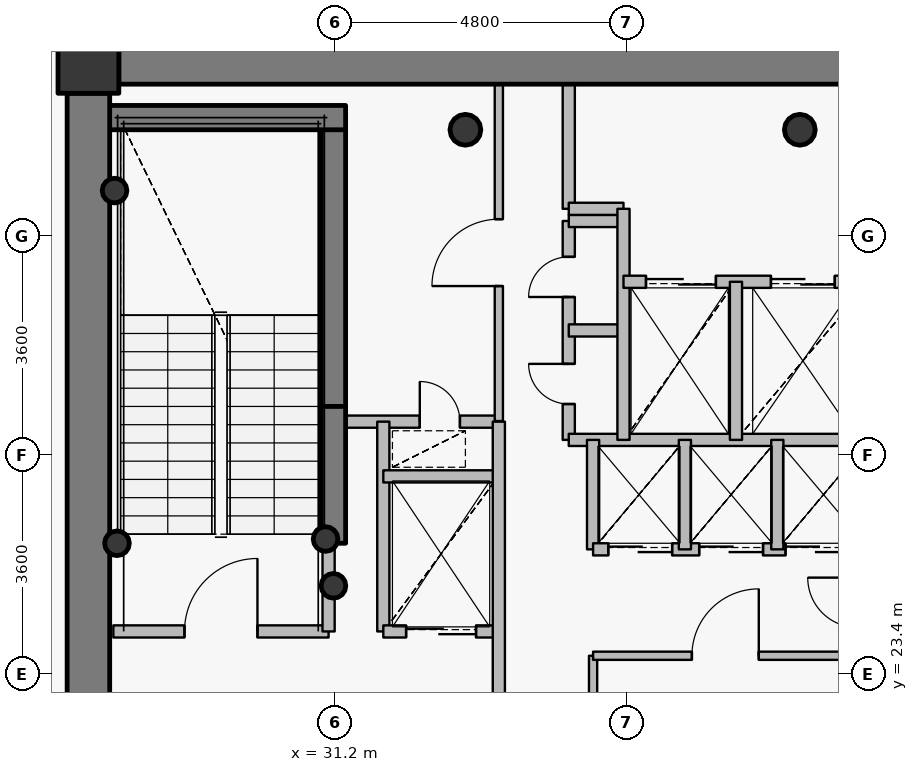
"""IFC4 building model, lengths in metres.
Left out: names, types, materials, properties, quantities, classifications, styles, units other than length and angle.
Written with IfcOpenShell. Run it as: python <this file> out.ifc"""

import sys

from ifc_helpers import new_model, si_unit, direction, frame, frame_2d, origin, origin_2d, place, context, subcontext, project, spatial, rectangle, hollow_circle, extrude, source, transform, mapped, element, fill, save


model = new_model("IFC4")
c1 = context("Model", 3, precision=1e-05, world=origin(), true_north=direction((0.0, 1.0)))
c2 = subcontext(c1, "Body", "Model", "MODEL_VIEW")
j1 = project(units=[si_unit("LENGTHUNIT", "METRE"), si_unit("PLANEANGLEUNIT", "RADIAN")], contexts=[c1])
p1 = place(None, origin())
s1 = spatial("IfcSite", under=j1, at=p1, CompositionType="ELEMENT")
p2 = place(p1, origin())
s2 = spatial("IfcBuilding", under=s1, at=p2, CompositionType="ELEMENT")
p3 = place(p2, frame((0.0, 0.0, 291.75)))
s3 = spatial("IfcBuildingStorey", under=s2, at=p3, CompositionType="ELEMENT", Elevation=291.75)
p4 = place(p3, frame((27.15, 33.45, 0.0), z_axis=(0.0, 0.0, 1.0), x_axis=(1.0, 0.0, 0.0)))
e1 = element("IfcColumn", 1, at=p4, inside=s3, PredefinedType="COLUMN", context=c2, shape_type="SweptSolid", body=[
    extrude(rectangle(XDim=1.0, YDim=1.0, at=origin_2d()), origin(), (0.0, 0.0, 1.0), 3.75),
])
for number, where, z_axis, x_axis in (
    (2, (38.85, 32.35, 0.0), (0.0, 0.0, 1.0), (1.0, 0.0, 0.0)),
    (3, (33.35, 32.35, 0.0), (0.0, 0.0, 1.0), (1.0, 0.0, 0.0)),
):
    element("IfcColumn", number, at=place(p3, frame(where, z_axis=z_axis, x_axis=x_axis)), inside=s3, PredefinedType="COLUMN", context=c2, shape_type="SweptSolid", body=[
        extrude(hollow_circle(Radius=0.254, WallThickness=0.02, at=origin_2d()), origin(), (0.0, 0.0, 1.0), 3.75),
    ])
p5 = place(p3, frame((31.18, 27.8, 0.0), z_axis=(0.0, 0.0, 1.0), x_axis=(0.0, 1.0, 0.0)))
e4 = element("IfcWall", 4, at=p5, inside=s3, PredefinedType="SHEAR", context=c2, shape_type="SweptSolid", body=[
    extrude(rectangle(XDim=4.75, YDim=0.4, at=frame_2d((2.375, 0.0))), origin(), (0.0, 0.0, 1.0), 3.75),
])
p6 = place(p3, frame((27.25, 32.55, 0.0), z_axis=(0.0, 0.0, 1.0), x_axis=(1.0, 0.0, 0.0)))
e5 = element("IfcWall", 5, at=p6, inside=s3, PredefinedType="SHEAR", context=c2, shape_type="SweptSolid", body=[
    extrude(rectangle(XDim=4.13, YDim=0.4, at=frame_2d((2.065, 0.0))), origin(), (0.0, 0.0, 1.0), 3.75),
])
for number, where, z_axis, x_axis in (
    (6, (27.58, 31.35, 0.0), (0.0, 0.0, 1.0), (1.0, 0.0, 0.0)),
    (7, (31.05, 25.62, 0.0), (0.0, 0.0, 1.0), (1.0, 0.0, 0.0)),
    (8, (31.18, 24.85, 0.0), (0.0, 0.0, 1.0), (1.0, 0.0, 0.0)),
    (9, (27.62, 25.55, 0.0), (0.0, 0.0, 1.0), (1.0, 0.0, 0.0)),
):
    element("IfcColumn", number, at=place(p3, frame(where, z_axis=z_axis, x_axis=x_axis)), inside=s3, PredefinedType="COLUMN", context=c2, shape_type="SweptSolid", body=[
        extrude(hollow_circle(Radius=0.203, WallThickness=0.016, at=origin_2d()), origin(), (0.0, 0.0, 1.0), 3.75),
    ])
p7 = place(p3, frame((27.65, 33.45, 0.0), z_axis=(0.0, 0.0, 1.0), x_axis=(1.0, 0.0, 0.0)))
e10 = element("IfcWall", 10, at=p7, inside=s3, PredefinedType="SHEAR", context=c2, shape_type="SweptSolid", body=[
    extrude(rectangle(XDim=16.7, YDim=0.7, at=frame_2d((8.35, 0.0))), origin(), (0.0, 0.0, 1.0), 3.05),
])
p8 = place(p7, frame((12.775, 0.0, 0.0)))
e11 = element("IfcOpeningElement", 11, at=p8, cuts=e10, PredefinedType="OPENING", context=c2, shape_type="SweptSolid", body=[
    extrude(rectangle(XDim=1.15, YDim=2.15, at=origin_2d()), frame((0.575, 0.36, 1.075), z_axis=(0.0, -1.0, 0.0), x_axis=(1.0, 0.0, 0.0)), (0.0, 0.0, 1.0), 0.72),
])
p9 = place(p3, frame((27.15, 21.05, 0.0), z_axis=(0.0, 0.0, 1.0), x_axis=(0.0, 1.0, 0.0)))
e12 = element("IfcWall", 12, at=p9, inside=s3, PredefinedType="SHEAR", context=c2, shape_type="SweptSolid", body=[
    extrude(rectangle(XDim=11.9, YDim=0.7, at=frame_2d((5.95, 0.0))), origin(), (0.0, 0.0, 1.0), 3.05),
])
p10 = place(p3, frame((31.18, 25.55, 0.0), z_axis=(0.0, 0.0, 1.0), x_axis=(0.0, 1.0, 0.0)))
e13 = element("IfcWall", 13, at=p10, inside=s3, PredefinedType="SHEAR", context=c2, shape_type="SweptSolid", body=[
    extrude(rectangle(XDim=2.25, YDim=0.4, at=frame_2d((1.125, 0.0))), origin(), (0.0, 0.0, 1.0), 3.1),
])
p11 = place(p3, frame((27.56, 24.1, 0.0), z_axis=(0.0, 0.0, 1.0), x_axis=(1.0, 0.0, 0.0)))
e14 = element("IfcWall", 14, at=p11, inside=s3, PredefinedType="PARTITIONING", context=c2, shape_type="SweptSolid", body=[
    extrude(rectangle(XDim=3.54, YDim=0.2, at=frame_2d((1.77, 0.0))), origin(), (0.0, 0.0, 1.0), 3.5),
])
p12 = place(p11, frame((1.17, 0.0, 0.0)))
e15 = element("IfcOpeningElement", 15, at=p12, cuts=e14, PredefinedType="OPENING", context=c2, shape_type="SweptSolid", body=[
    extrude(rectangle(XDim=1.2, YDim=2.15, at=origin_2d()), frame((0.6, 0.11, 1.075), z_axis=(0.0, -1.0, 0.0), x_axis=(1.0, 0.0, 0.0)), (0.0, 0.0, 1.0), 0.22),
])
p13 = place(p3, frame((31.1, 24.1, 0.0), z_axis=(0.0, 0.0, 1.0), x_axis=(0.0, 1.0, 0.0)))
e16 = element("IfcWall", 16, at=p13, inside=s3, PredefinedType="PARTITIONING", context=c2, shape_type="SweptSolid", body=[
    extrude(rectangle(XDim=1.44, YDim=0.2, at=frame_2d((0.72, 0.0))), origin(), (0.0, 0.0, 1.0), 3.5),
])
p14 = place(p3, frame((31.1, 27.55, 0.0), z_axis=(0.0, 0.0, 1.0), x_axis=(1.0, 0.0, 0.0)))
e17 = element("IfcWall", 17, at=p14, inside=s3, PredefinedType="PARTITIONING", context=c2, shape_type="SweptSolid", body=[
    extrude(rectangle(XDim=2.8, YDim=0.2, at=frame_2d((1.4, 0.0))), origin(), (0.0, 0.0, 1.0), 3.085),
])
p15 = place(p14, frame((1.5, 0.0, 0.0)))
e18 = element("IfcOpeningElement", 18, at=p15, cuts=e17, PredefinedType="OPENING", context=c2, shape_type="SweptSolid", body=[
    extrude(rectangle(XDim=0.66, YDim=2.05, at=origin_2d()), frame((0.33, 0.11, 1.025), z_axis=(0.0, -1.0, 0.0), x_axis=(1.0, 0.0, 0.0)), (0.0, 0.0, 1.0), 0.22),
])
p16 = place(p3, frame((32.0, 24.1, 0.0), z_axis=(0.0, 0.0, 1.0), x_axis=(0.0, 1.0, 0.0)))
e19 = element("IfcWall", 19, at=p16, inside=s3, PredefinedType="PARTITIONING", context=c2, shape_type="SweptSolid", body=[
    extrude(rectangle(XDim=3.45, YDim=0.2, at=frame_2d((1.725, 0.0))), origin(), (0.0, 0.0, 1.0), 3.5),
])
p17 = place(p3, frame((32.0, 24.1, 0.0), z_axis=(0.0, 0.0, 1.0), x_axis=(1.0, 0.0, 0.0)))
e20 = element("IfcWall", 20, at=p17, inside=s3, PredefinedType="PARTITIONING", context=c2, shape_type="SweptSolid", body=[
    extrude(rectangle(XDim=1.9, YDim=0.2, at=frame_2d((0.95, 0.0))), origin(), (0.0, 0.0, 1.0), 3.085),
])
p18 = place(p17, frame((0.375, 0.0, 0.0)))
e21 = element("IfcOpeningElement", 21, at=p18, cuts=e20, PredefinedType="OPENING", context=c2, shape_type="SweptSolid", body=[
    extrude(rectangle(XDim=1.15, YDim=2.15, at=origin_2d()), frame((0.575, 0.11, 1.075), z_axis=(0.0, -1.0, 0.0), x_axis=(1.0, 0.0, 0.0)), (0.0, 0.0, 1.0), 0.22),
])
p19 = place(p3, frame((32.0, 26.65, 0.0), z_axis=(0.0, 0.0, 1.0), x_axis=(1.0, 0.0, 0.0)))
e22 = element("IfcWall", 22, at=p19, inside=s3, PredefinedType="PARTITIONING", context=c2, shape_type="SweptSolid", body=[
    extrude(rectangle(XDim=1.9, YDim=0.2, at=frame_2d((0.95, 0.0))), origin(), (0.0, 0.0, 1.0), 3.085),
])
p20 = place(p3, frame((33.9, 20.9, 0.0), z_axis=(0.0, 0.0, 1.0), x_axis=(0.0, 1.0, 0.0)))
e23 = element("IfcWall", 23, at=p20, inside=s3, PredefinedType="PARTITIONING", context=c2, shape_type="SweptSolid", body=[
    extrude(rectangle(XDim=6.65, YDim=0.2, at=frame_2d((3.325, 0.0))), origin(), (0.0, 0.0, 1.0), 3.085),
])
p21 = place(p3, frame((33.9, 27.56, 0.0), z_axis=(0.0, 0.0, 1.0), x_axis=(0.0, 1.0, 0.0)))
e24 = element("IfcWall", 24, at=p21, inside=s3, PredefinedType="PARTITIONING", context=c2, shape_type="SweptSolid", body=[
    extrude(rectangle(XDim=5.54, YDim=0.135, at=frame_2d((2.77, 0.0))), origin(), (0.0, 0.0, 1.0), 3.085),
])
p22 = place(p21, frame((2.22, 0.0, 0.0)))
e25 = element("IfcOpeningElement", 25, at=p22, cuts=e24, PredefinedType="OPENING", context=c2, shape_type="SweptSolid", body=[
    extrude(rectangle(XDim=1.1, YDim=2.15, at=origin_2d()), frame((0.55, 0.078, 1.075), z_axis=(0.0, -1.0, 0.0), x_axis=(1.0, 0.0, 0.0)), (0.0, 0.0, 1.0), 0.155),
])
p23 = place(p3, frame((35.05, 27.25, 0.0), z_axis=(0.0, 0.0, 1.0), x_axis=(0.0, 1.0, 0.0)))
e26 = element("IfcWall", 26, at=p23, inside=s3, PredefinedType="PARTITIONING", context=c2, shape_type="SweptSolid", body=[
    extrude(rectangle(XDim=3.6, YDim=0.2, at=frame_2d((1.8, 0.0))), origin(), (0.0, 0.0, 1.0), 3.5),
])
p24 = place(p23, frame((0.59, 0.0, 0.0)))
e27 = element("IfcOpeningElement", 27, at=p24, cuts=e26, PredefinedType="OPENING", context=c2, shape_type="SweptSolid", body=[
    extrude(rectangle(XDim=0.66, YDim=2.05, at=origin_2d()), frame((0.33, 0.11, 1.025), z_axis=(0.0, -1.0, 0.0), x_axis=(1.0, 0.0, 0.0)), (0.0, 0.0, 1.0), 0.22),
])
p25 = place(p23, frame((2.35, 0.0, 0.0)))
e28 = element("IfcOpeningElement", 28, at=p25, cuts=e26, PredefinedType="OPENING", context=c2, shape_type="SweptSolid", body=[
    extrude(rectangle(XDim=0.66, YDim=2.05, at=origin_2d()), frame((0.33, 0.11, 1.025), z_axis=(0.0, -1.0, 0.0), x_axis=(1.0, 0.0, 0.0)), (0.0, 0.0, 1.0), 0.22),
])
p26 = place(p3, frame((35.05, 27.25, 0.0), z_axis=(0.0, 0.0, 1.0), x_axis=(1.0, 0.0, 0.0)))
e29 = element("IfcWall", 29, at=p26, inside=s3, PredefinedType="PARTITIONING", context=c2, shape_type="SweptSolid", body=[
    extrude(rectangle(XDim=4.95, YDim=0.2, at=frame_2d((2.475, 0.0))), origin(), (0.0, 0.0, 1.0), 3.085),
])
for number, where, z_axis, x_axis in (
    (30, (35.05, 29.05, 0.0), (0.0, 0.0, 1.0), (1.0, 0.0, 0.0)),
    (31, (35.05, 30.85, 0.0), (0.0, 0.0, 1.0), (1.0, 0.0, 0.0)),
):
    element("IfcWall", number, at=place(p3, frame(where, z_axis=z_axis, x_axis=x_axis)), inside=s3, PredefinedType="PARTITIONING", context=c2, shape_type="SweptSolid", body=[
        extrude(rectangle(XDim=0.9, YDim=0.2, at=frame_2d((0.45, 0.0))), origin(), (0.0, 0.0, 1.0), 3.5),
    ])
p27 = place(p3, frame((35.05, 31.05, 0.0), z_axis=(0.0, 0.0, 1.0), x_axis=(0.0, 1.0, 0.0)))
e32 = element("IfcWall", 32, at=p27, inside=s3, PredefinedType="PARTITIONING", context=c2, shape_type="SweptSolid", body=[
    extrude(rectangle(XDim=2.05, YDim=0.2, at=frame_2d((1.025, 0.0))), origin(), (0.0, 0.0, 1.0), 3.085),
])
p28 = place(p3, frame((35.05, 31.05, 0.0), z_axis=(0.0, 0.0, 1.0), x_axis=(1.0, 0.0, 0.0)))
e33 = element("IfcWall", 33, at=p28, inside=s3, PredefinedType="PARTITIONING", context=c2, shape_type="SweptSolid", body=[
    extrude(rectangle(XDim=0.9, YDim=0.2, at=frame_2d((0.45, 0.0))), origin(), (0.0, 0.0, 1.0), 3.5),
])
p29 = place(p3, frame((35.45, 20.9, 0.0), z_axis=(0.0, 0.0, 1.0), x_axis=(0.0, 1.0, 0.0)))
e34 = element("IfcWall", 34, at=p29, inside=s3, PredefinedType="PARTITIONING", context=c2, shape_type="SweptSolid", body=[
    extrude(rectangle(XDim=2.8, YDim=0.135, at=frame_2d((1.4, 0.0))), origin(), (0.0, 0.0, 1.0), 3.085),
])
p30 = place(p3, frame((35.45, 23.7, 0.0), z_axis=(0.0, 0.0, 1.0), x_axis=(1.0, 0.0, 0.0)))
e35 = element("IfcWall", 35, at=p30, inside=s3, PredefinedType="PARTITIONING", context=c2, shape_type="SweptSolid", body=[
    extrude(rectangle(XDim=4.35, YDim=0.135, at=frame_2d((2.175, 0.0))), origin(), (0.0, 0.0, 1.0), 3.085),
])
p31 = place(p30, frame((1.625, 0.0, 0.0)))
e36 = element("IfcOpeningElement", 36, at=p31, cuts=e35, PredefinedType="OPENING", context=c2, shape_type="SweptSolid", body=[
    extrude(rectangle(XDim=1.1, YDim=2.15, at=origin_2d()), frame((0.55, 0.078, 1.075), z_axis=(0.0, -1.0, 0.0), x_axis=(1.0, 0.0, 0.0)), (0.0, 0.0, 1.0), 0.155),
])
p32 = place(p3, frame((35.45, 25.45, 0.0), z_axis=(0.0, 0.0, 1.0), x_axis=(0.0, 1.0, 0.0)))
e37 = element("IfcWall", 37, at=p32, inside=s3, PredefinedType="PARTITIONING", context=c2, shape_type="SweptSolid", body=[
    extrude(rectangle(XDim=1.8, YDim=0.2, at=frame_2d((0.9, 0.0))), origin(), (0.0, 0.0, 1.0), 3.5),
])
p33 = place(p3, frame((35.45, 25.45, 0.0), z_axis=(0.0, 0.0, 1.0), x_axis=(1.0, 0.0, 0.0)))
e38 = element("IfcWall", 38, at=p33, inside=s3, PredefinedType="PARTITIONING", context=c2, shape_type="SweptSolid", body=[
    extrude(rectangle(XDim=4.55, YDim=0.2, at=frame_2d((2.275, 0.0))), origin(), (0.0, 0.0, 1.0), 3.085),
])
p34 = place(p33, frame((0.25, 0.0, 0.0)))
e39 = element("IfcOpeningElement", 39, at=p34, cuts=e38, PredefinedType="OPENING", context=c2, shape_type="SweptSolid", body=[
    extrude(rectangle(XDim=1.05, YDim=2.15, at=origin_2d()), frame((0.525, 0.11, 1.075), z_axis=(0.0, -1.0, 0.0), x_axis=(1.0, 0.0, 0.0)), (0.0, 0.0, 1.0), 0.22),
])
p35 = place(p33, frame((1.745, 0.0, 0.0)))
e40 = element("IfcOpeningElement", 40, at=p35, cuts=e38, PredefinedType="OPENING", context=c2, shape_type="SweptSolid", body=[
    extrude(rectangle(XDim=1.05, YDim=2.15, at=origin_2d()), frame((0.525, 0.11, 1.075), z_axis=(0.0, -1.0, 0.0), x_axis=(1.0, 0.0, 0.0)), (0.0, 0.0, 1.0), 0.22),
])
p36 = place(p33, frame((3.165, 0.0, 0.0)))
e41 = element("IfcOpeningElement", 41, at=p36, cuts=e38, PredefinedType="OPENING", context=c2, shape_type="SweptSolid", body=[
    extrude(rectangle(XDim=1.05, YDim=2.15, at=origin_2d()), frame((0.525, 0.11, 1.075), z_axis=(0.0, -1.0, 0.0), x_axis=(1.0, 0.0, 0.0)), (0.0, 0.0, 1.0), 0.22),
])
p37 = place(p3, frame((35.95, 27.25, 0.0), z_axis=(0.0, 0.0, 1.0), x_axis=(0.0, 1.0, 0.0)))
e42 = element("IfcWall", 42, at=p37, inside=s3, PredefinedType="PARTITIONING", context=c2, shape_type="SweptSolid", body=[
    extrude(rectangle(XDim=3.8, YDim=0.2, at=frame_2d((1.9, 0.0))), origin(), (0.0, 0.0, 1.0), 3.5),
])
p38 = place(p3, frame((35.95, 29.85, 0.0), z_axis=(0.0, 0.0, 1.0), x_axis=(1.0, 0.0, 0.0)))
e43 = element("IfcWall", 43, at=p38, inside=s3, PredefinedType="PARTITIONING", context=c2, shape_type="SweptSolid", body=[
    extrude(rectangle(XDim=8.49, YDim=0.2, at=frame_2d((4.245, 0.0))), origin(), (0.0, 0.0, 1.0), 3.085),
])
p39 = place(p38, frame((6.1, 0.0, 0.0)))
e44 = element("IfcOpeningElement", 44, at=p39, cuts=e43, PredefinedType="OPENING", context=c2, shape_type="SweptSolid", body=[
    extrude(rectangle(XDim=1.2, YDim=2.15, at=origin_2d()), frame((0.6, 0.11, 1.075), z_axis=(0.0, -1.0, 0.0), x_axis=(1.0, 0.0, 0.0)), (0.0, 0.0, 1.0), 0.22),
])
p40 = place(p38, frame((0.37, 0.0, 0.0)))
e45 = element("IfcOpeningElement", 45, at=p40, cuts=e43, PredefinedType="OPENING", context=c2, shape_type="SweptSolid", body=[
    extrude(rectangle(XDim=1.15, YDim=2.15, at=origin_2d()), frame((0.575, 0.11, 1.075), z_axis=(0.0, -1.0, 0.0), x_axis=(1.0, 0.0, 0.0)), (0.0, 0.0, 1.0), 0.22),
])
p41 = place(p38, frame((2.425, 0.0, 0.0)))
e46 = element("IfcOpeningElement", 46, at=p41, cuts=e43, PredefinedType="OPENING", context=c2, shape_type="SweptSolid", body=[
    extrude(rectangle(XDim=1.05, YDim=2.15, at=origin_2d()), frame((0.525, 0.11, 1.075), z_axis=(0.0, -1.0, 0.0), x_axis=(1.0, 0.0, 0.0)), (0.0, 0.0, 1.0), 0.22),
])
p42 = place(p3, frame((36.96, 25.45, 0.0), z_axis=(0.0, 0.0, 1.0), x_axis=(0.0, 1.0, 0.0)))
e47 = element("IfcWall", 47, at=p42, inside=s3, PredefinedType="PARTITIONING", context=c2, shape_type="SweptSolid", body=[
    extrude(rectangle(XDim=1.8, YDim=0.2, at=frame_2d((0.9, 0.0))), origin(), (0.0, 0.0, 1.0), 3.5),
])
p43 = place(p3, frame((37.8, 27.25, 0.0), z_axis=(0.0, 0.0, 1.0), x_axis=(0.0, 1.0, 0.0)))
e48 = element("IfcWall", 48, at=p43, inside=s3, PredefinedType="PARTITIONING", context=c2, shape_type="SweptSolid", body=[
    extrude(rectangle(XDim=2.6, YDim=0.2, at=frame_2d((1.3, 0.0))), origin(), (0.0, 0.0, 1.0), 3.5),
])
p44 = place(p3, frame((38.48, 25.45, 0.0), z_axis=(0.0, 0.0, 1.0), x_axis=(0.0, 1.0, 0.0)))
e49 = element("IfcWall", 49, at=p44, inside=s3, PredefinedType="PARTITIONING", context=c2, shape_type="SweptSolid", body=[
    extrude(rectangle(XDim=1.8, YDim=0.2, at=frame_2d((0.9, 0.0))), origin(), (0.0, 0.0, 1.0), 3.5),
])
p45 = place(p3, frame((26.8, 33.492, 0.0), z_axis=(0.0, 0.0, 1.0), x_axis=(0.0, -1.0, 0.0)))
e50 = element("IfcWall", 50, at=p45, inside=s3, PredefinedType="PARTITIONING", context=c2, shape_type="SweptSolid", body=[
    extrude(rectangle(XDim=0.532, YDim=0.135, at=frame_2d((0.266, 0.0))), origin(), (0.0, 0.0, 1.0), 3.5),
])
m1 = source(origin(), c2, "Body", "SweptSolid", [
    extrude(rectangle(XDim=1.2, YDim=2.15, at=origin_2d()), frame((0.6, 0.025, 1.075), z_axis=(0.0, -1.0, 0.0), x_axis=(1.0, 0.0, 0.0)), (0.0, 0.0, 1.0), 0.05),
])
p46 = place(p12, origin())
e51 = element("IfcDoor", 51, at=p46, inside=s3, OperationType="SINGLE_SWING_RIGHT", PredefinedType="DOOR", context=c2, shape_type="MappedRepresentation", body=[
    mapped(m1, transform((0.0, 0.0, 0.0), x_axis=(1.0, 0.0, 0.0), y_axis=(0.0, 1.0, 0.0), z_axis=(0.0, 0.0, 1.0), scale=1.0)),
])
fill(e15, e51)
m2 = source(origin(), c2, "Body", "SweptSolid", [
    extrude(rectangle(XDim=1.15, YDim=2.15, at=origin_2d()), frame((0.575, 0.025, 1.075), z_axis=(0.0, -1.0, 0.0), x_axis=(1.0, 0.0, 0.0)), (0.0, 0.0, 1.0), 0.05),
])
p47 = place(p40, origin())
e52 = element("IfcDoor", 52, at=p47, inside=s3, OperationType="DOUBLE_DOOR_SLIDING", PredefinedType="USERDEFINED", context=c2, shape_type="MappedRepresentation", body=[
    mapped(m2, transform((0.0, 0.0, 0.0), x_axis=(1.0, 0.0, 0.0), y_axis=(0.0, 1.0, 0.0), z_axis=(0.0, 0.0, 1.0), scale=1.0)),
])
fill(e45, e52)
p48 = place(p18, origin())
e53 = element("IfcDoor", 53, at=p48, inside=s3, OperationType="DOUBLE_DOOR_SLIDING", PredefinedType="USERDEFINED", context=c2, shape_type="MappedRepresentation", body=[
    mapped(m2, transform((0.0, 0.0, 0.0), x_axis=(1.0, 0.0, 0.0), y_axis=(0.0, 1.0, 0.0), z_axis=(0.0, 0.0, 1.0), scale=1.0)),
])
fill(e21, e53)
m3 = source(origin(), c2, "Body", "SweptSolid", [
    extrude(rectangle(XDim=1.05, YDim=2.15, at=origin_2d()), frame((0.525, 0.025, 1.075), z_axis=(0.0, -1.0, 0.0), x_axis=(1.0, 0.0, 0.0)), (0.0, 0.0, 1.0), 0.05),
])
p49 = place(p41, origin())
e54 = element("IfcDoor", 54, at=p49, inside=s3, OperationType="DOUBLE_DOOR_SLIDING", PredefinedType="USERDEFINED", context=c2, shape_type="MappedRepresentation", body=[
    mapped(m3, transform((0.0, 0.0, 0.0), x_axis=(1.0, 0.0, 0.0), y_axis=(0.0, 1.0, 0.0), z_axis=(0.0, 0.0, 1.0), scale=1.0)),
])
fill(e46, e54)
p50 = place(p34, origin())
e55 = element("IfcDoor", 55, at=p50, inside=s3, OperationType="DOUBLE_DOOR_SLIDING", PredefinedType="USERDEFINED", context=c2, shape_type="MappedRepresentation", body=[
    mapped(m3, transform((0.0, 0.0, 0.0), x_axis=(1.0, 0.0, 0.0), y_axis=(0.0, 1.0, 0.0), z_axis=(0.0, 0.0, 1.0), scale=1.0)),
])
fill(e39, e55)
p51 = place(p35, origin())
e56 = element("IfcDoor", 56, at=p51, inside=s3, OperationType="DOUBLE_DOOR_SLIDING", PredefinedType="USERDEFINED", context=c2, shape_type="MappedRepresentation", body=[
    mapped(m3, transform((0.0, 0.0, 0.0), x_axis=(1.0, 0.0, 0.0), y_axis=(0.0, 1.0, 0.0), z_axis=(0.0, 0.0, 1.0), scale=1.0)),
])
fill(e40, e56)
p52 = place(p36, origin())
e57 = element("IfcDoor", 57, at=p52, inside=s3, OperationType="DOUBLE_DOOR_SLIDING", PredefinedType="USERDEFINED", context=c2, shape_type="MappedRepresentation", body=[
    mapped(m3, transform((0.0, 0.0, 0.0), x_axis=(1.0, 0.0, 0.0), y_axis=(0.0, 1.0, 0.0), z_axis=(0.0, 0.0, 1.0), scale=1.0)),
])
fill(e41, e57)
m4 = source(origin(), c2, "Body", "SweptSolid", [
    extrude(rectangle(XDim=0.66, YDim=2.05, at=origin_2d()), frame((0.33, 0.025, 1.025), z_axis=(0.0, -1.0, 0.0), x_axis=(1.0, 0.0, 0.0)), (0.0, 0.0, 1.0), 0.05),
])
p53 = place(p24, origin())
e58 = element("IfcDoor", 58, at=p53, inside=s3, OperationType="SINGLE_SWING_RIGHT", PredefinedType="USERDEFINED", context=c2, shape_type="MappedRepresentation", body=[
    mapped(m4, transform((0.0, 0.0, 0.0), x_axis=(1.0, 0.0, 0.0), y_axis=(0.0, 1.0, 0.0), z_axis=(0.0, 0.0, 1.0), scale=1.0)),
])
fill(e27, e58)
p54 = place(p25, origin())
e59 = element("IfcDoor", 59, at=p54, inside=s3, OperationType="SINGLE_SWING_LEFT", PredefinedType="USERDEFINED", context=c2, shape_type="MappedRepresentation", body=[
    mapped(m4, transform((0.0, 0.0, 0.0), x_axis=(1.0, 0.0, 0.0), y_axis=(0.0, 1.0, 0.0), z_axis=(0.0, 0.0, 1.0), scale=1.0)),
])
fill(e28, e59)
m5 = source(origin(), c2, "Body", "SweptSolid", [
    extrude(rectangle(XDim=1.1, YDim=2.15, at=origin_2d()), frame((0.55, 0.025, 1.075), z_axis=(0.0, -1.0, 0.0), x_axis=(1.0, 0.0, 0.0)), (0.0, 0.0, 1.0), 0.05),
])
p55 = place(p31, origin())
e60 = element("IfcDoor", 60, at=p55, inside=s3, OperationType="SINGLE_SWING_RIGHT", PredefinedType="DOOR", context=c2, shape_type="MappedRepresentation", body=[
    mapped(m5, transform((0.0, 0.0, 0.0), x_axis=(1.0, 0.0, 0.0), y_axis=(0.0, 1.0, 0.0), z_axis=(0.0, 0.0, 1.0), scale=1.0)),
])
fill(e36, e60)
p56 = place(p22, origin())
e61 = element("IfcDoor", 61, at=p56, inside=s3, OperationType="SINGLE_SWING_LEFT", PredefinedType="DOOR", context=c2, shape_type="MappedRepresentation", body=[
    mapped(m5, transform((0.0, 0.0, 0.0), x_axis=(1.0, 0.0, 0.0), y_axis=(0.0, 1.0, 0.0), z_axis=(0.0, 0.0, 1.0), scale=1.0)),
])
fill(e25, e61)
p57 = place(p15, origin())
e62 = element("IfcDoor", 62, at=p57, inside=s3, OperationType="SINGLE_SWING_LEFT", PredefinedType="USERDEFINED", context=c2, shape_type="MappedRepresentation", body=[
    mapped(m4, transform((0.0, 0.0, 0.0), x_axis=(1.0, 0.0, 0.0), y_axis=(0.0, 1.0, 0.0), z_axis=(0.0, 0.0, 1.0), scale=1.0)),
])
fill(e18, e62)
save(model, sys.argv[1])
